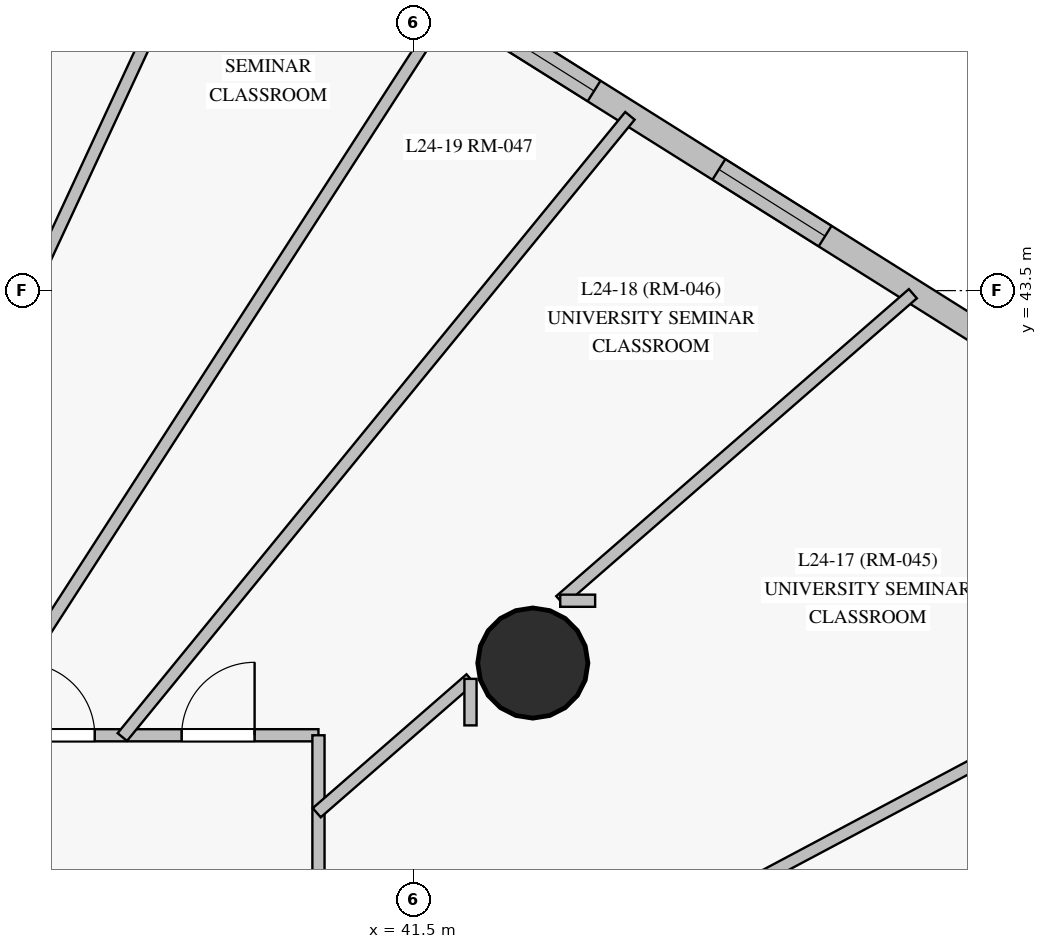
"""IFC4 building model, lengths in metres.
Left out: names, types, materials, properties, quantities, classifications, styles, units other than length and angle.
Written with IfcOpenShell. Run it as: python <this file> out.ifc"""

import sys

from ifc_helpers import new_model, si_unit, direction, frame, frame_2d, origin, origin_with_axes, origin_2d, place, context, subcontext, project, spatial, rectangle, circle, extrude, source, transform, mapped, element, fill, save


model = new_model("IFC4")
c1 = context("Model", 3, precision=1e-05, world=origin(), true_north=direction((0.0, 1.0)))
c2 = subcontext(c1, "Body", "Model", "MODEL_VIEW")
j1 = project(units=[si_unit("LENGTHUNIT", "METRE"), si_unit("PLANEANGLEUNIT", "RADIAN")], contexts=[c1])
p1 = place(None, origin())
s1 = spatial("IfcSite", under=j1, at=p1, CompositionType="ELEMENT")
p2 = place(p1, origin())
s2 = spatial("IfcBuilding", under=s1, at=p2, CompositionType="ELEMENT")
p3 = place(p2, frame((0.0, 0.0, 92.2)))
s3 = spatial("IfcBuildingStorey", under=s2, at=p3, CompositionType="ELEMENT", Elevation=92.2)
m1 = source(origin_with_axes(), c2, "Body", "SweptSolid", [
    extrude(circle(Radius=0.725, at=origin_2d()), origin(), (0.0, 0.0, 1.0), 4.0),
])
p4 = place(p3, frame((43.07, 38.6, 0.0), z_axis=(0.0, 0.0, 1.0), x_axis=(1.0, 0.0, 0.0)))
e1 = element("IfcColumn", 1, at=p4, inside=s3, PredefinedType="COLUMN", context=c2, shape_type="MappedRepresentation", body=[
    mapped(m1, transform((0.0, 0.0, 0.0), scale=1.0)),
])
p5 = place(p3, frame((49.552, 42.561, 0.0), z_axis=(0.0, 0.0, 1.0), x_axis=(-0.846842838453, 0.531843216523, 0.0)))
e2 = element("IfcWall", 2, at=p5, inside=s3, PredefinedType="SOLIDWALL", context=c2, shape_type="SweptSolid", body=[
    extrude(rectangle(XDim=12.474, YDim=0.32, at=frame_2d((6.237, 0.0))), origin(), (0.0, 0.0, 1.0), 3.775),
])
p6 = place(p5, frame((3.114, 0.0, 0.85)))
e3 = element("IfcOpeningElement", 3, at=p6, cuts=e2, PredefinedType="OPENING", context=c2, shape_type="SweptSolid", body=[
    extrude(rectangle(XDim=1.65, YDim=1.65, at=frame_2d((0.825, 0.825))), frame((0.0, 0.17, 0.0), z_axis=(0.0, -1.0, 0.0), x_axis=(1.0, 0.0, 0.0)), (0.0, 0.0, 1.0), 0.34),
])
p7 = place(p5, frame((6.703, 0.0, 0.85)))
e4 = element("IfcOpeningElement", 4, at=p7, cuts=e2, PredefinedType="OPENING", context=c2, shape_type="SweptSolid", body=[
    extrude(rectangle(XDim=1.65, YDim=1.65, at=frame_2d((0.825, 0.825))), frame((0.0, 0.17, 0.0), z_axis=(0.0, -1.0, 0.0), x_axis=(1.0, 0.0, 0.0)), (0.0, 0.0, 1.0), 0.34),
])
p8 = place(p5, frame((9.818, 0.0, 0.85)))
e5 = element("IfcOpeningElement", 5, at=p8, cuts=e2, PredefinedType="OPENING", context=c2, shape_type="SweptSolid", body=[
    extrude(rectangle(XDim=1.65, YDim=1.65, at=frame_2d((0.825, 0.825))), frame((0.0, 0.17, 0.0), z_axis=(0.0, -1.0, 0.0), x_axis=(1.0, 0.0, 0.0)), (0.0, 0.0, 1.0), 0.34),
])
p9 = place(p3, frame((14.974, 37.65, 0.0), z_axis=(0.0, 0.0, 1.0), x_axis=(1.0, 0.0, 0.0)))
e6 = element("IfcWall", 6, at=p9, inside=s3, PredefinedType="PARTITIONING", context=c2, shape_type="SweptSolid", body=[
    extrude(rectangle(XDim=25.276, YDim=0.16, at=frame_2d((12.638, 0.0))), origin(), (0.0, 0.0, 1.0), 3.275),
])
p10 = place(p9, frame((23.476, 0.0, 0.0)))
e7 = element("IfcOpeningElement", 7, at=p10, cuts=e6, PredefinedType="OPENING", context=c2, shape_type="SweptSolid", body=[
    extrude(rectangle(XDim=0.96, YDim=2.15, at=frame_2d((0.48, 1.075))), frame((0.0, 0.09, 0.0), z_axis=(0.0, -1.0, 0.0), x_axis=(1.0, 0.0, 0.0)), (0.0, 0.0, 1.0), 0.18),
])
p11 = place(p9, frame((21.383, 0.0, 0.0)))
e8 = element("IfcOpeningElement", 8, at=p11, cuts=e6, PredefinedType="OPENING", context=c2, shape_type="SweptSolid", body=[
    extrude(rectangle(XDim=0.95, YDim=2.15, at=frame_2d((0.475, 1.075))), frame((0.0, 0.09, 0.0), z_axis=(0.0, -1.0, 0.0), x_axis=(1.0, 0.0, 0.0)), (0.0, 0.0, 1.0), 0.18),
])
p12 = place(p9, frame((19.184, 0.0, 0.0)))
e9 = element("IfcOpeningElement", 9, at=p12, cuts=e6, PredefinedType="OPENING", context=c2, shape_type="SweptSolid", body=[
    extrude(rectangle(XDim=0.96, YDim=2.15, at=frame_2d((0.48, 1.075))), frame((0.0, 0.09, 0.0), z_axis=(0.0, -1.0, 0.0), x_axis=(1.0, 0.0, 0.0)), (0.0, 0.0, 1.0), 0.18),
])
p13 = place(p9, frame((16.318, 0.0, 0.0)))
e10 = element("IfcOpeningElement", 10, at=p13, cuts=e6, PredefinedType="OPENING", context=c2, shape_type="SweptSolid", body=[
    extrude(rectangle(XDim=0.96, YDim=2.15, at=frame_2d((0.48, 1.075))), frame((0.0, 0.09, 0.0), z_axis=(0.0, -1.0, 0.0), x_axis=(1.0, 0.0, 0.0)), (0.0, 0.0, 1.0), 0.18),
])
p14 = place(p9, frame((12.104, 0.0, 0.0)))
e11 = element("IfcOpeningElement", 11, at=p14, cuts=e6, PredefinedType="OPENING", context=c2, shape_type="SweptSolid", body=[
    extrude(rectangle(XDim=0.96, YDim=2.15, at=frame_2d((0.48, 1.075))), frame((0.0, 0.09, 0.0), z_axis=(0.0, -1.0, 0.0), x_axis=(1.0, 0.0, 0.0)), (0.0, 0.0, 1.0), 0.18),
])
p15 = place(p9, frame((8.331, 0.0, 0.0)))
e12 = element("IfcOpeningElement", 12, at=p15, cuts=e6, PredefinedType="OPENING", context=c2, shape_type="SweptSolid", body=[
    extrude(rectangle(XDim=0.96, YDim=2.15, at=frame_2d((0.48, 1.075))), frame((0.0, 0.09, 0.0), z_axis=(0.0, -1.0, 0.0), x_axis=(1.0, 0.0, 0.0)), (0.0, 0.0, 1.0), 0.18),
])
p16 = place(p9, frame((5.815, 0.0, 0.0)))
e13 = element("IfcOpeningElement", 13, at=p16, cuts=e6, PredefinedType="OPENING", context=c2, shape_type="SweptSolid", body=[
    extrude(rectangle(XDim=0.95, YDim=2.15, at=frame_2d((0.475, 1.075))), frame((0.0, 0.09, 0.0), z_axis=(0.0, -1.0, 0.0), x_axis=(1.0, 0.0, 0.0)), (0.0, 0.0, 1.0), 0.18),
])
p17 = place(p3, frame((40.25, 37.65, 0.0), z_axis=(0.0, 0.0, 1.0), x_axis=(0.0, -1.0, 0.0)))
e14 = element("IfcWall", 14, at=p17, inside=s3, PredefinedType="PARTITIONING", context=c2, shape_type="SweptSolid", body=[
    extrude(rectangle(XDim=22.3, YDim=0.16, at=frame_2d((11.15, 0.0))), origin(), (0.0, 0.0, 1.0), 3.175),
])
p18 = place(p17, frame((16.25, 0.0, 0.0)))
e15 = element("IfcOpeningElement", 15, at=p18, cuts=e14, PredefinedType="OPENING", context=c2, shape_type="SweptSolid", body=[
    extrude(rectangle(XDim=0.96, YDim=2.15, at=frame_2d((0.48, 1.075))), frame((0.0, 0.09, 0.0), z_axis=(0.0, -1.0, 0.0), x_axis=(1.0, 0.0, 0.0)), (0.0, 0.0, 1.0), 0.18),
])
p19 = place(p17, frame((10.675, 0.0, 0.0)))
e16 = element("IfcOpeningElement", 16, at=p19, cuts=e14, PredefinedType="OPENING", context=c2, shape_type="SweptSolid", body=[
    extrude(rectangle(XDim=0.95, YDim=2.15, at=frame_2d((0.475, 1.075))), frame((0.0, 0.09, 0.0), z_axis=(0.0, -1.0, 0.0), x_axis=(1.0, 0.0, 0.0)), (0.0, 0.0, 1.0), 0.18),
])
p20 = place(p17, frame((9.178, 0.0, 0.0)))
e17 = element("IfcOpeningElement", 17, at=p20, cuts=e14, PredefinedType="OPENING", context=c2, shape_type="SweptSolid", body=[
    extrude(rectangle(XDim=0.86, YDim=2.1, at=frame_2d((0.43, 1.05))), frame((0.0, 0.09, 0.0), z_axis=(0.0, -1.0, 0.0), x_axis=(1.0, 0.0, 0.0)), (0.0, 0.0, 1.0), 0.18),
])
p21 = place(p17, frame((6.39, 0.0, 0.0)))
e18 = element("IfcOpeningElement", 18, at=p21, cuts=e14, PredefinedType="OPENING", context=c2, shape_type="SweptSolid", body=[
    extrude(rectangle(XDim=0.96, YDim=2.15, at=frame_2d((0.48, 1.075))), frame((0.0, 0.09, 0.0), z_axis=(0.0, -1.0, 0.0), x_axis=(1.0, 0.0, 0.0)), (0.0, 0.0, 1.0), 0.18),
])
p22 = place(p17, frame((5.24, 0.0, 0.0)))
e19 = element("IfcOpeningElement", 19, at=p22, cuts=e14, PredefinedType="OPENING", context=c2, shape_type="SweptSolid", body=[
    extrude(rectangle(XDim=0.95, YDim=2.15, at=frame_2d((0.475, 1.075))), frame((0.0, 0.09, 0.0), z_axis=(0.0, -1.0, 0.0), x_axis=(1.0, 0.0, 0.0)), (0.0, 0.0, 1.0), 0.18),
])
p23 = place(p17, frame((2.386, 0.0, 0.0)))
e20 = element("IfcOpeningElement", 20, at=p23, cuts=e14, PredefinedType="OPENING", context=c2, shape_type="SweptSolid", body=[
    extrude(rectangle(XDim=0.96, YDim=2.15, at=frame_2d((0.48, 1.075))), frame((0.0, 0.09, 0.0), z_axis=(0.0, -1.0, 0.0), x_axis=(1.0, 0.0, 0.0)), (0.0, 0.0, 1.0), 0.18),
])
p24 = place(p3, frame((33.729, 37.623, 0.0), z_axis=(0.0, 0.0, 1.0), x_axis=(0.421024135542, 0.907049434866, 0.0)))
e21 = element("IfcWall", 21, at=p24, inside=s3, PredefinedType="PARTITIONING", context=c2, shape_type="SweptSolid", body=[
    extrude(rectangle(XDim=12.673, YDim=0.16, at=frame_2d((6.336, 0.0))), origin(), (0.0, 0.0, 1.0), 3.775),
])
p25 = place(p3, frame((40.21, 32.658, 0.0), z_axis=(0.0, 0.0, 1.0), x_axis=(0.88295316145, 0.469461089639, 0.0)))
e22 = element("IfcWall", 22, at=p25, inside=s3, PredefinedType="PARTITIONING", context=c2, shape_type="SweptSolid", body=[
    extrude(rectangle(XDim=11.943, YDim=0.16, at=frame_2d((5.972, 0.0))), origin(), (0.0, 0.0, 1.0), 3.775),
])
p26 = place(p3, frame((35.742, 37.612, 0.0), z_axis=(0.0, 0.0, 1.0), x_axis=(0.542226381043, 0.840232439091, 0.0)))
e23 = element("IfcWall", 23, at=p26, inside=s3, PredefinedType="PARTITIONING", context=c2, shape_type="SweptSolid", body=[
    extrude(rectangle(XDim=11.511, YDim=0.16, at=frame_2d((5.756, 0.0))), origin(), (0.0, 0.0, 1.0), 3.775),
])
p27 = place(p3, frame((37.67, 37.627, 0.0), z_axis=(0.0, 0.0, 1.0), x_axis=(0.632743862199, 0.774361159182, 0.0)))
e24 = element("IfcWall", 24, at=p27, inside=s3, PredefinedType="PARTITIONING", context=c2, shape_type="SweptSolid", body=[
    extrude(rectangle(XDim=10.554, YDim=0.16, at=frame_2d((5.277, 0.0))), origin(), (0.0, 0.0, 1.0), 3.775),
])
p28 = place(p3, frame((43.431, 39.42, 0.0), z_axis=(0.0, 0.0, 1.0), x_axis=(0.754202064337, 0.656642403557, 0.0)))
e25 = element("IfcWall", 25, at=p28, inside=s3, PredefinedType="PARTITIONING", context=c2, shape_type="SweptSolid", body=[
    extrude(rectangle(XDim=6.151, YDim=0.16, at=frame_2d((3.076, 0.0))), origin(), (0.0, 0.0, 1.0), 3.775),
])
p29 = place(p3, frame((40.227, 36.631, 0.0), z_axis=(0.0, 0.0, 1.0), x_axis=(0.754215383826, 0.656627104832, 0.0)))
e26 = element("IfcWall", 26, at=p29, inside=s3, PredefinedType="PARTITIONING", context=c2, shape_type="SweptSolid", body=[
    extrude(rectangle(XDim=2.682, YDim=0.16, at=frame_2d((1.341, 0.0))), origin(), (0.0, 0.0, 1.0), 2.975),
])
p30 = place(p3, frame((42.25, 38.392, 0.0), z_axis=(0.0, 0.0, 1.0), x_axis=(0.0, -1.0, 0.0)))
e27 = element("IfcWall", 27, at=p30, inside=s3, PredefinedType="PARTITIONING", context=c2, shape_type="SweptSolid", body=[
    extrude(rectangle(XDim=0.612, YDim=0.16, at=frame_2d((0.306, 0.0))), origin(), (0.0, 0.0, 1.0), 3.275),
])
p31 = place(p3, frame((43.89, 39.42, 0.0), z_axis=(0.0, 0.0, 1.0), x_axis=(-1.0, 0.0, 0.0)))
e28 = element("IfcWall", 28, at=p31, inside=s3, PredefinedType="PARTITIONING", context=c2, shape_type="SweptSolid", body=[
    extrude(rectangle(XDim=0.459, YDim=0.16, at=frame_2d((0.229, 0.0))), origin(), (0.0, 0.0, 1.0), 3.775),
])
m2 = source(origin_with_axes(), c2, "Body", "SweptSolid", [
    extrude(rectangle(XDim=1.65, YDim=1.65, at=frame_2d((0.825, 0.825))), frame((0.0, 0.03, 0.0), z_axis=(0.0, -1.0, 0.0), x_axis=(1.0, 0.0, 0.0)), (0.0, 0.0, 1.0), 0.06),
])
p32 = place(p6, origin())
e29 = element("IfcWindow", 29, at=p32, inside=s3, PartitioningType="SINGLE_PANEL", PredefinedType="WINDOW", context=c2, shape_type="MappedRepresentation", body=[
    mapped(m2, transform((0.0, 0.0, 0.0), scale=1.0)),
])
fill(e3, e29)
p33 = place(p7, origin())
e30 = element("IfcWindow", 30, at=p33, inside=s3, PartitioningType="SINGLE_PANEL", PredefinedType="WINDOW", context=c2, shape_type="MappedRepresentation", body=[
    mapped(m2, transform((0.0, 0.0, 0.0), scale=1.0)),
])
fill(e4, e30)
m3 = source(origin_with_axes(), c2, "Body", "SweptSolid", [
    extrude(rectangle(XDim=0.96, YDim=2.15, at=frame_2d((0.48, 1.075))), frame((0.0, 0.025, 0.0), z_axis=(0.0, -1.0, 0.0), x_axis=(1.0, 0.0, 0.0)), (0.0, 0.0, 1.0), 0.05),
])
p34 = place(p10, origin())
e31 = element("IfcDoor", 31, at=p34, inside=s3, OperationType="SINGLE_SWING_RIGHT", PredefinedType="DOOR", context=c2, shape_type="MappedRepresentation", body=[
    mapped(m3, transform((0.0, 0.0, 0.0), scale=1.0)),
])
fill(e7, e31)
m4 = source(origin_with_axes(), c2, "Body", "SweptSolid", [
    extrude(rectangle(XDim=0.95, YDim=2.15, at=frame_2d((0.475, 1.075))), frame((0.0, 0.025, 0.0), z_axis=(0.0, -1.0, 0.0), x_axis=(1.0, 0.0, 0.0)), (0.0, 0.0, 1.0), 0.05),
])
p35 = place(p11, origin())
e32 = element("IfcDoor", 32, at=p35, inside=s3, OperationType="SINGLE_SWING_LEFT", PredefinedType="DOOR", context=c2, shape_type="MappedRepresentation", body=[
    mapped(m4, transform((0.0, 0.0, 0.0), scale=1.0)),
])
fill(e8, e32)
save(model, sys.argv[1])
